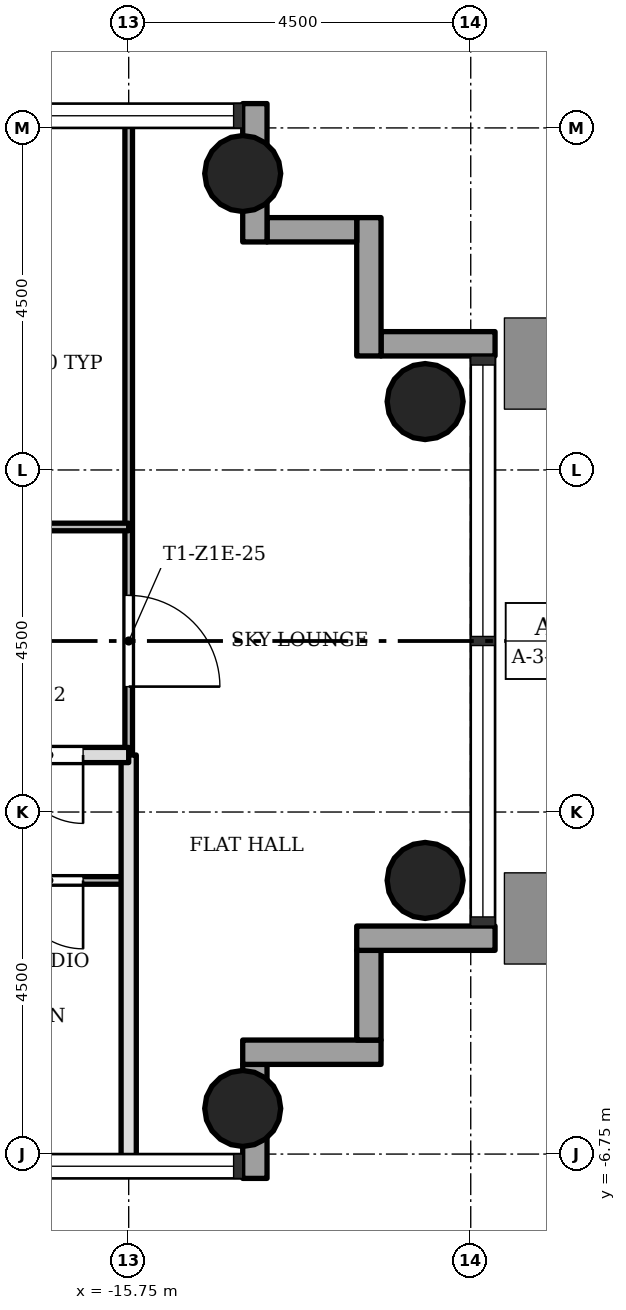
"""IFC4 building model, lengths in metres.
Left out: names, types, materials, properties, quantities, classifications, styles, units other than length and angle.
Written with IfcOpenShell. Run it as: python <this file> out.ifc"""

import sys

from ifc_helpers import new_model, si_unit, direction, frame, frame_2d, origin, origin_2d, place, context, subcontext, project, spatial, rectangle, hollow_circle, extrude, element, fill, save


model = new_model("IFC4")
c1 = context("Model", 3, precision=1e-05, world=origin(), true_north=direction((0.0, 1.0)))
c2 = subcontext(c1, "Body", "Model", "MODEL_VIEW")
j1 = project(units=[si_unit("LENGTHUNIT", "METRE"), si_unit("PLANEANGLEUNIT", "RADIAN")], contexts=[c1])
p1 = place(None, origin())
s1 = spatial("IfcSite", under=j1, at=p1, CompositionType="ELEMENT")
p2 = place(p1, origin())
s2 = spatial("IfcBuilding", under=s1, at=p2, CompositionType="ELEMENT")
p3 = place(p2, frame((0.0, 0.0, 65.3)))
s3 = spatial("IfcBuildingStorey", under=s2, at=p3, CompositionType="ELEMENT", Elevation=65.3)
for number, where, z_axis, x_axis in (
    (1, (-14.25, -6.15, 0.0), (0.0, 0.0, 1.0), (1.0, 0.0, 0.0)),
    (2, (-14.25, 6.15, 0.0), (0.0, 0.0, 1.0), (1.0, 0.0, 0.0)),
    (3, (-11.85, -3.15, 0.0), (0.0, 0.0, 1.0), (1.0, 0.0, 0.0)),
    (4, (-11.85, 3.15, 0.0), (0.0, 0.0, 1.0), (1.0, 0.0, 0.0)),
):
    element("IfcColumn", number, at=place(p3, frame(where, z_axis=z_axis, x_axis=x_axis)), inside=s3, PredefinedType="COLUMN", context=c2, shape_type="SweptSolid", body=[
        extrude(hollow_circle(Radius=0.5, WallThickness=0.036, at=origin_2d()), origin(), (0.0, 0.0, 1.0), 3.4),
    ])
p4 = place(p3, frame((-14.09, -7.07, -0.3), z_axis=(0.0, 0.0, 1.0), x_axis=(0.0, 1.0, 0.0)))
e5 = element("IfcWall", 5, at=p4, inside=s3, PredefinedType="STANDARD", context=c2, shape_type="SweptSolid", body=[
    extrude(rectangle(XDim=1.5, YDim=0.32, at=frame_2d((0.75, 0.0))), origin(), (0.0, 0.0, 1.0), 3.4),
])
p5 = place(p3, frame((-14.25, -5.41, -0.3), z_axis=(0.0, 0.0, 1.0), x_axis=(1.0, 0.0, 0.0)))
e6 = element("IfcWall", 6, at=p5, inside=s3, PredefinedType="STANDARD", context=c2, shape_type="SweptSolid", body=[
    extrude(rectangle(XDim=1.82, YDim=0.32, at=frame_2d((0.91, 0.0))), origin(), (0.0, 0.0, 1.0), 3.4),
])
p6 = place(p3, frame((-12.59, -5.25, -0.3), z_axis=(0.0, 0.0, 1.0), x_axis=(0.0, 1.0, 0.0)))
e7 = element("IfcWall", 7, at=p6, inside=s3, PredefinedType="STANDARD", context=c2, shape_type="SweptSolid", body=[
    extrude(rectangle(XDim=1.18, YDim=0.32, at=frame_2d((0.59, 0.0))), origin(), (0.0, 0.0, 1.0), 3.4),
])
p7 = place(p3, frame((-12.75, -3.91, -0.3), z_axis=(0.0, 0.0, 1.0), x_axis=(1.0, 0.0, 0.0)))
e8 = element("IfcWall", 8, at=p7, inside=s3, PredefinedType="STANDARD", context=c2, shape_type="SweptSolid", body=[
    extrude(rectangle(XDim=1.82, YDim=0.32, at=frame_2d((0.91, 0.0))), origin(), (0.0, 0.0, 1.0), 3.4),
])
p8 = place(p3, frame((-10.93, 3.91, -0.3), z_axis=(0.0, 0.0, 1.0), x_axis=(-1.0, 0.0, 0.0)))
e9 = element("IfcWall", 9, at=p8, inside=s3, PredefinedType="STANDARD", context=c2, shape_type="SweptSolid", body=[
    extrude(rectangle(XDim=1.5, YDim=0.32, at=frame_2d((0.75, 0.0))), origin(), (0.0, 0.0, 1.0), 3.4),
])
p9 = place(p3, frame((-12.59, 3.75, -0.3), z_axis=(0.0, 0.0, 1.0), x_axis=(0.0, 1.0, 0.0)))
e10 = element("IfcWall", 10, at=p9, inside=s3, PredefinedType="STANDARD", context=c2, shape_type="SweptSolid", body=[
    extrude(rectangle(XDim=1.82, YDim=0.32, at=frame_2d((0.91, 0.0))), origin(), (0.0, 0.0, 1.0), 3.4),
])
p10 = place(p3, frame((-12.75, 5.41, -0.3), z_axis=(0.0, 0.0, 1.0), x_axis=(-1.0, 0.0, 0.0)))
e11 = element("IfcWall", 11, at=p10, inside=s3, PredefinedType="STANDARD", context=c2, shape_type="SweptSolid", body=[
    extrude(rectangle(XDim=1.18, YDim=0.32, at=frame_2d((0.59, 0.0))), origin(), (0.0, 0.0, 1.0), 3.4),
])
p11 = place(p3, frame((-14.09, 5.25, -0.3), z_axis=(0.0, 0.0, 1.0), x_axis=(0.0, 1.0, 0.0)))
e12 = element("IfcWall", 12, at=p11, inside=s3, PredefinedType="STANDARD", context=c2, shape_type="SweptSolid", body=[
    extrude(rectangle(XDim=1.82, YDim=0.32, at=frame_2d((0.91, 0.0))), origin(), (0.0, 0.0, 1.0), 3.4),
])
p12 = place(p3, frame((-15.75, -1.5, 0.0), z_axis=(0.0, 0.0, 1.0), x_axis=(0.0, 1.0, 0.0)))
e13 = element("IfcWall", 13, at=p12, inside=s3, PredefinedType="PARTITIONING", context=c2, shape_type="SweptSolid", body=[
    extrude(rectangle(XDim=8.35, YDim=0.1, at=frame_2d((4.175, 0.0))), origin(), (0.0, 0.0, 1.0), 3.0),
])
p13 = place(p12, frame((0.9, 0.0, 0.0)))
e14 = element("IfcOpeningElement", 14, at=p13, cuts=e13, PredefinedType="OPENING", context=c2, shape_type="SweptSolid", body=[
    extrude(rectangle(XDim=1.2, YDim=2.1, at=frame_2d((0.6, 1.05))), frame((0.0, 0.06, 0.0), z_axis=(0.0, -1.0, 0.0), x_axis=(1.0, 0.0, 0.0)), (0.0, 0.0, 1.0), 0.12),
])
p14 = place(p3, frame((-15.75, -6.85, 0.0), z_axis=(0.0, 0.0, 1.0), x_axis=(0.0, 1.0, 0.0)))
e15 = element("IfcWall", 15, at=p14, inside=s3, PredefinedType="SOLIDWALL", context=c2, shape_type="SweptSolid", body=[
    extrude(rectangle(XDim=5.35, YDim=0.2, at=frame_2d((2.675, 0.0))), origin(), (0.0, 0.0, 1.0), 3.0),
])
p15 = place(p3, frame((-20.25, -3.15, 0.0), z_axis=(0.0, 0.0, 1.0), x_axis=(1.0, 0.0, 0.0)))
e16 = element("IfcWall", 16, at=p15, inside=s3, PredefinedType="PARTITIONING", context=c2, shape_type="SweptSolid", body=[
    extrude(rectangle(XDim=4.5, YDim=0.1, at=frame_2d((2.25, 0.0))), origin(), (0.0, 0.0, 1.0), 3.0),
])
p16 = place(p15, frame((3.0, 0.0, 0.0)))
e17 = element("IfcOpeningElement", 17, at=p16, cuts=e16, PredefinedType="OPENING", context=c2, shape_type="SweptSolid", body=[
    extrude(rectangle(XDim=0.9, YDim=2.1, at=frame_2d((0.45, 1.05))), frame((0.0, 0.06, 0.0), z_axis=(0.0, -1.0, 0.0), x_axis=(1.0, 0.0, 0.0)), (0.0, 0.0, 1.0), 0.12),
])
p17 = place(p3, frame((-20.25, -1.5, 0.0), z_axis=(0.0, 0.0, 1.0), x_axis=(1.0, 0.0, 0.0)))
e18 = element("IfcWall", 18, at=p17, inside=s3, PredefinedType="SOLIDWALL", context=c2, shape_type="SweptSolid", body=[
    extrude(rectangle(XDim=4.5, YDim=0.2, at=frame_2d((2.25, 0.0))), origin(), (0.0, 0.0, 1.0), 3.0),
])
p18 = place(p17, frame((3.0, 0.0, 0.0)))
e19 = element("IfcOpeningElement", 19, at=p18, cuts=e18, PredefinedType="OPENING", context=c2, shape_type="SweptSolid", body=[
    extrude(rectangle(XDim=0.9, YDim=2.1, at=frame_2d((0.45, 1.05))), frame((0.0, 0.11, 0.0), z_axis=(0.0, -1.0, 0.0), x_axis=(1.0, 0.0, 0.0)), (0.0, 0.0, 1.0), 0.22),
])
p19 = place(p3, frame((-20.25, 1.5, 0.0), z_axis=(0.0, 0.0, 1.0), x_axis=(1.0, 0.0, 0.0)))
e20 = element("IfcWall", 20, at=p19, inside=s3, PredefinedType="PARTITIONING", context=c2, shape_type="SweptSolid", body=[
    extrude(rectangle(XDim=4.5, YDim=0.1, at=frame_2d((2.25, 0.0))), origin(), (0.0, 0.0, 1.0), 3.0),
])
p20 = place(p19, frame((1.8, 0.0, 0.0)))
e21 = element("IfcOpeningElement", 21, at=p20, cuts=e20, PredefinedType="OPENING", context=c2, shape_type="SweptSolid", body=[
    extrude(rectangle(XDim=0.9, YDim=2.1, at=frame_2d((0.45, 1.05))), frame((0.0, 0.06, 0.0), z_axis=(0.0, -1.0, 0.0), x_axis=(1.0, 0.0, 0.0)), (0.0, 0.0, 1.0), 0.12),
])
p21 = place(p18, origin())
e22 = element("IfcDoor", 22, at=p21, inside=s3, OperationType="SINGLE_SWING_RIGHT", PredefinedType="DOOR", context=c2, shape_type="SweptSolid", body=[
    extrude(rectangle(XDim=0.9, YDim=2.1, at=frame_2d((0.45, 1.05))), frame((0.0, 0.025, 0.0), z_axis=(0.0, -1.0, 0.0), x_axis=(1.0, 0.0, 0.0)), (0.0, 0.0, 1.0), 0.05),
])
fill(e19, e22)
p22 = place(p16, origin())
e23 = element("IfcDoor", 23, at=p22, inside=s3, OperationType="SINGLE_SWING_RIGHT", PredefinedType="DOOR", context=c2, shape_type="SweptSolid", body=[
    extrude(rectangle(XDim=0.9, YDim=2.1, at=frame_2d((0.45, 1.05))), frame((0.0, 0.025, 0.0), z_axis=(0.0, -1.0, 0.0), x_axis=(1.0, 0.0, 0.0)), (0.0, 0.0, 1.0), 0.05),
])
fill(e17, e23)
p23 = place(p13, origin())
e24 = element("IfcDoor", 24, at=p23, inside=s3, OperationType="SINGLE_SWING_LEFT", PredefinedType="DOOR", context=c2, shape_type="SweptSolid", body=[
    extrude(rectangle(XDim=1.2, YDim=2.1, at=frame_2d((0.6, 1.05))), frame((0.0, 0.025, 0.0), z_axis=(0.0, -1.0, 0.0), x_axis=(1.0, 0.0, 0.0)), (0.0, 0.0, 1.0), 0.05),
])
fill(e14, e24)
save(model, sys.argv[1])
